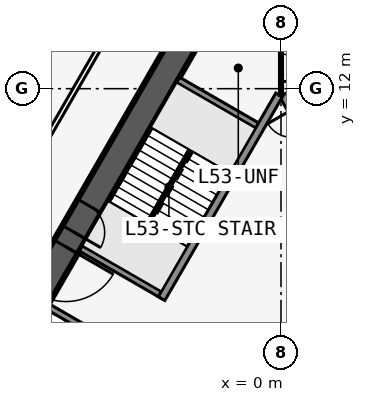
"""IFC4 building model, lengths in metres.
Left out: names, types, materials, properties, quantities, classifications, styles, units other than length and angle.
Written with IfcOpenShell. Run it as: python <this file> out.ifc"""

import sys

from ifc_helpers import new_model, si_unit, direction, frame, frame_2d, origin, place, context, subcontext, project, spatial, rectangle, extrude, element, fill, save


model = new_model("IFC4")
c1 = context("Model", 3, precision=1e-05, world=origin(), true_north=direction((0.0, 1.0)))
c2 = subcontext(c1, "Body", "Model", "MODEL_VIEW")
j1 = project(units=[si_unit("LENGTHUNIT", "METRE"), si_unit("PLANEANGLEUNIT", "RADIAN")], contexts=[c1])
p1 = place(None, origin())
s1 = spatial("IfcSite", under=j1, at=p1, CompositionType="ELEMENT")
p2 = place(p1, origin())
s2 = spatial("IfcBuilding", under=s1, at=p2, CompositionType="ELEMENT")
p3 = place(p2, frame((0.0, 0.0, 200.9)))
s3 = spatial("IfcBuildingStorey", under=s2, at=p3, CompositionType="ELEMENT", Elevation=200.9)
p4 = place(p3, frame((16.5, -9.526, 0.0), z_axis=(0.0, 0.0, 1.0), x_axis=(-0.499999749417, 0.866025548458, 0.0)))
e1 = element("IfcWall", 1, at=p4, inside=s3, PredefinedType="SHEAR", context=c2, shape_type="SweptSolid", body=[
    extrude(rectangle(XDim=33.0, YDim=0.9, at=frame_2d((16.5, 0.0))), origin(), (0.0, 0.0, 1.0), 3.6),
])
p5 = place(p4, frame((14.15, 0.0, 0.0)))
e2 = element("IfcOpeningElement", 2, at=p5, cuts=e1, PredefinedType="OPENING", context=c2, shape_type="SweptSolid", body=[
    extrude(rectangle(XDim=1.8, YDim=2.13, at=frame_2d((0.9, 1.065))), frame((0.0, 0.46, 0.0), z_axis=(0.0, -1.0, 0.0), x_axis=(1.0, 0.0, 0.0)), (0.0, 0.0, 1.0), 0.92),
])
p6 = place(p4, frame((12.6, 0.0, 0.0)))
e3 = element("IfcOpeningElement", 3, at=p6, cuts=e1, PredefinedType="OPENING", context=c2, shape_type="SweptSolid", body=[
    extrude(rectangle(XDim=1.0, YDim=2.13, at=frame_2d((0.5, 1.065))), frame((0.0, 0.46, 0.0), z_axis=(0.0, -1.0, 0.0), x_axis=(1.0, 0.0, 0.0)), (0.0, 0.0, 1.0), 0.92),
])
p7 = place(p3, frame((5.379, 2.586, 0.0), z_axis=(0.0, 0.0, 1.0), x_axis=(-0.500001375892, 0.866024609411, 0.0)))
e4 = element("IfcWall", 4, at=p7, inside=s3, PredefinedType="SOLIDWALL", context=c2, shape_type="SweptSolid", body=[
    extrude(rectangle(XDim=10.633, YDim=0.25, at=frame_2d((5.316, 0.0))), origin(), (0.0, 0.0, 1.0), 3.435),
])
p8 = place(p7, frame((9.164, 0.0, 0.0)))
e5 = element("IfcOpeningElement", 5, at=p8, cuts=e4, PredefinedType="OPENING", context=c2, shape_type="SweptSolid", body=[
    extrude(rectangle(XDim=0.9, YDim=2.13, at=frame_2d((0.45, 1.065))), frame((0.0, 0.135, 0.0), z_axis=(0.0, -1.0, 0.0), x_axis=(1.0, 0.0, 0.0)), (0.0, 0.0, 1.0), 0.27),
])
p9 = place(p7, frame((1.0, 0.0, 0.0)))
e6 = element("IfcOpeningElement", 6, at=p9, cuts=e4, PredefinedType="OPENING", context=c2, shape_type="SweptSolid", body=[
    extrude(rectangle(XDim=1.1, YDim=2.13, at=frame_2d((0.55, 1.065))), frame((0.0, 0.135, 0.0), z_axis=(0.0, -1.0, 0.0), x_axis=(1.0, 0.0, 0.0)), (0.0, 0.0, 1.0), 0.27),
])
p10 = place(p7, frame((3.9, 0.0, 0.0)))
e7 = element("IfcOpeningElement", 7, at=p10, cuts=e4, PredefinedType="OPENING", context=c2, shape_type="SweptSolid", body=[
    extrude(rectangle(XDim=1.1, YDim=2.13, at=frame_2d((0.55, 1.065))), frame((0.0, 0.135, 0.0), z_axis=(0.0, -1.0, 0.0), x_axis=(1.0, 0.0, 0.0)), (0.0, 0.0, 1.0), 0.27),
])
p11 = place(p7, frame((6.8, 0.0, 0.0)))
e8 = element("IfcOpeningElement", 8, at=p11, cuts=e4, PredefinedType="OPENING", context=c2, shape_type="SweptSolid", body=[
    extrude(rectangle(XDim=1.1, YDim=2.13, at=frame_2d((0.55, 1.065))), frame((0.0, 0.135, 0.0), z_axis=(0.0, -1.0, 0.0), x_axis=(1.0, 0.0, 0.0)), (0.0, 0.0, 1.0), 0.27),
])
p12 = place(p3, frame((0.0, 19.052, 0.0), z_axis=(0.0, 0.0, 1.0), x_axis=(-0.499999749417, -0.866025548458, 0.0)))
e9 = element("IfcWall", 9, at=p12, inside=s3, PredefinedType="SHEAR", context=c2, shape_type="SweptSolid", body=[
    extrude(rectangle(XDim=33.0, YDim=0.9, at=frame_2d((16.5, 0.0))), origin(), (0.0, 0.0, 1.0), 3.6),
])
p13 = place(p12, frame((14.15, 0.0, 0.0)))
e10 = element("IfcOpeningElement", 10, at=p13, cuts=e9, PredefinedType="OPENING", context=c2, shape_type="SweptSolid", body=[
    extrude(rectangle(XDim=1.8, YDim=2.13, at=frame_2d((0.9, 1.065))), frame((0.0, 0.46, 0.0), z_axis=(0.0, -1.0, 0.0), x_axis=(1.0, 0.0, 0.0)), (0.0, 0.0, 1.0), 0.92),
])
p14 = place(p12, frame((12.6, 0.0, 0.0)))
e11 = element("IfcOpeningElement", 11, at=p14, cuts=e9, PredefinedType="OPENING", context=c2, shape_type="SweptSolid", body=[
    extrude(rectangle(XDim=1.0, YDim=2.13, at=frame_2d((0.5, 1.065))), frame((0.0, 0.46, 0.0), z_axis=(0.0, -1.0, 0.0), x_axis=(1.0, 0.0, 0.0)), (0.0, 0.0, 1.0), 0.92),
])
p15 = place(p3, frame((-0.062, 11.794, 0.0), z_axis=(0.0, 0.0, 1.0), x_axis=(-0.500006680225, -0.86602154692, 0.0)))
e12 = element("IfcWall", 12, at=p15, inside=s3, PredefinedType="SOLIDWALL", context=c2, shape_type="SweptSolid", body=[
    extrude(rectangle(XDim=7.733, YDim=0.25, at=frame_2d((3.866, 0.0))), origin(), (0.0, 0.0, 1.0), 3.435),
])
for number, where, z_axis, x_axis in (
    (13, (-0.679, 10.727, 0.0), (0.0, 0.0, 1.0), (-0.866, 0.5, 0.0)),
    (14, (-3.879, 5.184, 0.0), (0.0, 0.0, 1.0), (-0.866, 0.5, 0.0)),
    (15, (-4.979, 3.279, 0.0), (0.0, 0.0, 1.0), (-0.866, 0.5, 0.0)),
):
    element("IfcWall", number, at=place(p3, frame(where, z_axis=z_axis, x_axis=x_axis)), inside=s3, PredefinedType="SOLIDWALL", context=c2, shape_type="SweptSolid", body=[
        extrude(rectangle(XDim=3.125, YDim=0.2, at=frame_2d((1.562, 0.0))), origin(), (0.0, 0.0, 1.0), 3.435),
    ])
p16 = place(p3, frame((-0.5, 22.836, 0.0), z_axis=(0.0, 0.0, 1.0), x_axis=(-0.500001677587, -0.866024435227, 0.0)))
e16 = element("IfcWall", 16, at=p16, inside=s3, PredefinedType="PARTITIONING", context=c2, shape_type="SweptSolid", body=[
    extrude(rectangle(XDim=39.054, YDim=0.15, at=frame_2d((19.527, 0.0))), origin(), (0.0, 0.0, 1.0), 3.435),
])
p17 = place(p16, frame((0.952, 0.0, 0.0)))
e17 = element("IfcOpeningElement", 17, at=p17, cuts=e16, PredefinedType="OPENING", context=c2, shape_type="SweptSolid", body=[
    extrude(rectangle(XDim=0.95, YDim=2.13, at=frame_2d((0.475, 1.065))), frame((0.0, 0.085, 0.0), z_axis=(0.0, -1.0, 0.0), x_axis=(1.0, 0.0, 0.0)), (0.0, 0.0, 1.0), 0.17),
])
p18 = place(p16, frame((7.752, 0.0, 0.0)))
e18 = element("IfcOpeningElement", 18, at=p18, cuts=e16, PredefinedType="OPENING", context=c2, shape_type="SweptSolid", body=[
    extrude(rectangle(XDim=0.95, YDim=2.13, at=frame_2d((0.475, 1.065))), frame((0.0, 0.085, 0.0), z_axis=(0.0, -1.0, 0.0), x_axis=(1.0, 0.0, 0.0)), (0.0, 0.0, 1.0), 0.17),
])
p19 = place(p16, frame((17.152, 0.0, 0.0)))
e19 = element("IfcOpeningElement", 19, at=p19, cuts=e16, PredefinedType="OPENING", context=c2, shape_type="SweptSolid", body=[
    extrude(rectangle(XDim=0.95, YDim=2.13, at=frame_2d((0.475, 1.065))), frame((0.0, 0.085, 0.0), z_axis=(0.0, -1.0, 0.0), x_axis=(1.0, 0.0, 0.0)), (0.0, 0.0, 1.0), 0.17),
])
p20 = place(p16, frame((26.552, 0.0, 0.0)))
e20 = element("IfcOpeningElement", 20, at=p20, cuts=e16, PredefinedType="OPENING", context=c2, shape_type="SweptSolid", body=[
    extrude(rectangle(XDim=0.95, YDim=2.13, at=frame_2d((0.475, 1.065))), frame((0.0, 0.085, 0.0), z_axis=(0.0, -1.0, 0.0), x_axis=(1.0, 0.0, 0.0)), (0.0, 0.0, 1.0), 0.17),
])
p21 = place(p16, frame((37.152, 0.0, 0.0)))
e21 = element("IfcOpeningElement", 21, at=p21, cuts=e16, PredefinedType="OPENING", context=c2, shape_type="SweptSolid", body=[
    extrude(rectangle(XDim=0.95, YDim=2.13, at=frame_2d((0.475, 1.065))), frame((0.0, 0.085, 0.0), z_axis=(0.0, -1.0, 0.0), x_axis=(1.0, 0.0, 0.0)), (0.0, 0.0, 1.0), 0.17),
])
p22 = place(p3, frame((0.0, 14.052, 0.0), z_axis=(0.0, 0.0, 1.0), x_axis=(0.0, -1.0, 0.0)))
e22 = element("IfcWall", 22, at=p22, inside=s3, PredefinedType="PARTITIONING", context=c2, shape_type="SweptSolid", body=[
    extrude(rectangle(XDim=2.275, YDim=0.1, at=frame_2d((1.138, 0.0))), origin(), (0.0, 0.0, 1.0), 3.435),
])
p23 = place(p22, frame((0.915, 0.0, 0.0)))
e23 = element("IfcOpeningElement", 23, at=p23, cuts=e22, PredefinedType="OPENING", context=c2, shape_type="SweptSolid", body=[
    extrude(rectangle(XDim=0.9, YDim=2.13, at=frame_2d((0.45, 1.065))), frame((0.0, 0.06, 0.0), z_axis=(0.0, -1.0, 0.0), x_axis=(1.0, 0.0, 0.0)), (0.0, 0.0, 1.0), 0.12),
])
p24 = place(p3, frame((-2.988, 9.978, 0.0), z_axis=(0.0, 0.0, 1.0), x_axis=(-0.499992232847, -0.866029888106, 0.0)))
e24 = element("IfcWall", 24, at=p24, inside=s3, PredefinedType="SOLIDWALL", context=c2, shape_type="SweptSolid", body=[
    extrude(rectangle(XDim=2.794, YDim=0.1, at=frame_2d((1.397, 0.0))), origin(), (0.0, 0.0, 1.0), 3.6),
])
p25 = place(p13, origin())
e25 = element("IfcDoor", 25, at=p25, inside=s3, OperationType="DOUBLE_DOOR_SINGLE_SWING", PredefinedType="DOOR", context=c2, shape_type="SweptSolid", body=[
    extrude(rectangle(XDim=1.8, YDim=2.13, at=frame_2d((0.9, 1.065))), frame((0.0, 0.025, 0.0), z_axis=(0.0, -1.0, 0.0), x_axis=(1.0, 0.0, 0.0)), (0.0, 0.0, 1.0), 0.05),
])
fill(e10, e25)
p26 = place(p14, origin())
e26 = element("IfcDoor", 26, at=p26, inside=s3, OperationType="SINGLE_SWING_RIGHT", PredefinedType="DOOR", context=c2, shape_type="SweptSolid", body=[
    extrude(rectangle(XDim=1.0, YDim=2.13, at=frame_2d((0.5, 1.065))), frame((0.0, 0.025, 0.0), z_axis=(0.0, -1.0, 0.0), x_axis=(1.0, 0.0, 0.0)), (0.0, 0.0, 1.0), 0.05),
])
fill(e11, e26)
p27 = place(p23, origin())
e27 = element("IfcDoor", 27, at=p27, inside=s3, OperationType="SINGLE_SWING_RIGHT", PredefinedType="DOOR", context=c2, shape_type="SweptSolid", body=[
    extrude(rectangle(XDim=0.9, YDim=2.13, at=frame_2d((0.45, 1.065))), frame((0.0, 0.025, 0.0), z_axis=(0.0, -1.0, 0.0), x_axis=(1.0, 0.0, 0.0)), (0.0, 0.0, 1.0), 0.05),
])
fill(e23, e27)
save(model, sys.argv[1])
